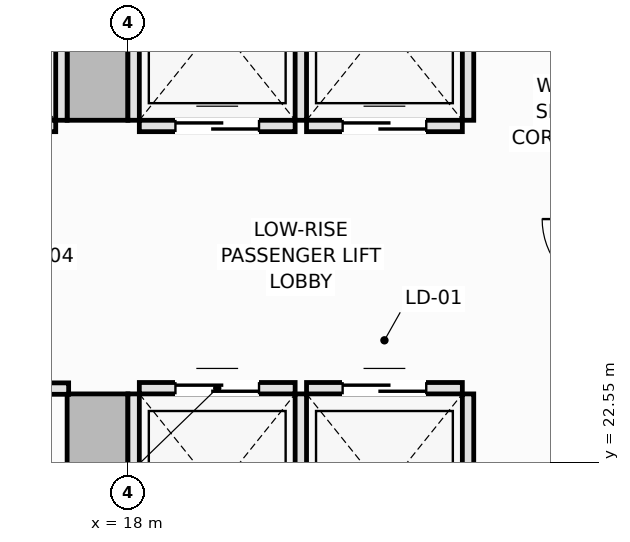
"""IFC4 building model, lengths in metres.
Left out: names, types, materials, properties, quantities, classifications, styles, units other than length and angle.
Written with IfcOpenShell. Run it as: python <this file> out.ifc"""

import sys

from ifc_helpers import new_model, si_unit, direction, frame, frame_2d, origin, place, context, subcontext, project, spatial, rectangle, extrude, element, fill, save


model = new_model("IFC4")
c1 = context("Model", 3, precision=1e-05, world=origin(), true_north=direction((0.0, 1.0)))
c2 = subcontext(c1, "Body", "Model", "MODEL_VIEW")
j1 = project(units=[si_unit("LENGTHUNIT", "METRE"), si_unit("PLANEANGLEUNIT", "RADIAN")], contexts=[c1])
p1 = place(None, origin())
s1 = spatial("IfcSite", under=j1, at=p1, CompositionType="ELEMENT")
p2 = place(p1, origin())
s2 = spatial("IfcBuilding", under=s1, at=p2, CompositionType="ELEMENT")
p3 = place(p2, frame((0.0, 0.0, 29.15)))
s3 = spatial("IfcBuildingStorey", under=s2, at=p3, CompositionType="ELEMENT", Elevation=29.15)
p4 = place(p3, frame((17.6, 14.8, 0.0), z_axis=(0.0, 0.0, 1.0), x_axis=(0.0, 1.0, 0.0)))
e1 = element("IfcWall", 1, at=p4, inside=s3, PredefinedType="SHEAR", context=c2, shape_type="SweptSolid", body=[
    extrude(rectangle(XDim=8.65, YDim=0.8, at=frame_2d((4.325, 0.0))), origin(), (0.0, 0.0, 1.0), 3.55),
])
p5 = place(p4, frame((4.1, 0.0, 0.0)))
e2 = element("IfcOpeningElement", 2, at=p5, cuts=e1, PredefinedType="OPENING", context=c2, shape_type="SweptSolid", body=[
    extrude(rectangle(XDim=1.1, YDim=2.15, at=frame_2d((0.55, 1.075))), frame((0.0, 0.41, 0.0), z_axis=(0.0, -1.0, 0.0), x_axis=(1.0, 0.0, 0.0)), (0.0, 0.0, 1.0), 0.82),
])
p6 = place(p3, frame((17.6, 27.05, 0.0), z_axis=(0.0, 0.0, 1.0), x_axis=(0.0, 1.0, 0.0)))
e3 = element("IfcWall", 3, at=p6, inside=s3, PredefinedType="SHEAR", context=c2, shape_type="SweptSolid", body=[
    extrude(rectangle(XDim=8.65, YDim=0.8, at=frame_2d((4.325, 0.0))), origin(), (0.0, 0.0, 1.0), 3.55),
])
p7 = place(p6, frame((3.45, 0.0, 0.0)))
e4 = element("IfcOpeningElement", 4, at=p7, cuts=e3, PredefinedType="OPENING", context=c2, shape_type="SweptSolid", body=[
    extrude(rectangle(XDim=1.1, YDim=2.15, at=frame_2d((0.55, 1.075))), frame((0.0, 0.41, 0.0), z_axis=(0.0, -1.0, 0.0), x_axis=(1.0, 0.0, 0.0)), (0.0, 0.0, 1.0), 0.82),
])
p8 = place(p3, frame((18.15, 23.525, 0.0), z_axis=(0.0, 0.0, 1.0), x_axis=(1.0, 0.0, 0.0)))
e5 = element("IfcWall", 5, at=p8, inside=s3, PredefinedType="PARTITIONING", context=c2, shape_type="SweptSolid", body=[
    extrude(rectangle(XDim=2.05, YDim=0.15, at=frame_2d((1.025, 0.0))), origin(), (0.0, 0.0, 1.0), 3.37),
])
p9 = place(p8, frame((0.475, 0.0, 0.0)))
e6 = element("IfcOpeningElement", 6, at=p9, cuts=e5, PredefinedType="OPENING", context=c2, shape_type="SweptSolid", body=[
    extrude(rectangle(XDim=1.1, YDim=2.2, at=frame_2d((0.55, 1.1))), frame((0.0, 0.085, 0.0), z_axis=(0.0, -1.0, 0.0), x_axis=(1.0, 0.0, 0.0)), (0.0, 0.0, 1.0), 0.17),
])
for number, where, z_axis, x_axis in (
    (7, (18.075, 20.9, 0.0), (0.0, 0.0, 1.0), (0.0, 1.0, 0.0)),
    (8, (20.275, 20.9, 0.0), (0.0, 0.0, 1.0), (0.0, 1.0, 0.0)),
):
    element("IfcWall", number, at=place(p3, frame(where, z_axis=z_axis, x_axis=x_axis)), inside=s3, PredefinedType="PARTITIONING", context=c2, shape_type="SweptSolid", body=[
        extrude(rectangle(XDim=2.55, YDim=0.15, at=frame_2d((1.275, 0.0))), origin(), (0.0, 0.0, 1.0), 3.37),
    ])
p10 = place(p3, frame((20.35, 23.525, 0.0), z_axis=(0.0, 0.0, 1.0), x_axis=(1.0, 0.0, 0.0)))
e9 = element("IfcWall", 9, at=p10, inside=s3, PredefinedType="PARTITIONING", context=c2, shape_type="SweptSolid", body=[
    extrude(rectangle(XDim=2.05, YDim=0.15, at=frame_2d((1.025, 0.0))), origin(), (0.0, 0.0, 1.0), 3.37),
])
p11 = place(p10, frame((0.475, 0.0, 0.0)))
e10 = element("IfcOpeningElement", 10, at=p11, cuts=e9, PredefinedType="OPENING", context=c2, shape_type="SweptSolid", body=[
    extrude(rectangle(XDim=1.1, YDim=2.2, at=frame_2d((0.55, 1.1))), frame((0.0, 0.085, 0.0), z_axis=(0.0, -1.0, 0.0), x_axis=(1.0, 0.0, 0.0)), (0.0, 0.0, 1.0), 0.17),
])
p12 = place(p3, frame((22.475, 20.9, 0.0), z_axis=(0.0, 0.0, 1.0), x_axis=(0.0, 1.0, 0.0)))
e11 = element("IfcWall", 11, at=p12, inside=s3, PredefinedType="PARTITIONING", context=c2, shape_type="SweptSolid", body=[
    extrude(rectangle(XDim=2.55, YDim=0.15, at=frame_2d((1.275, 0.0))), origin(), (0.0, 0.0, 1.0), 3.37),
])
p13 = place(p3, frame((18.15, 26.975, 0.0), z_axis=(0.0, 0.0, 1.0), x_axis=(1.0, 0.0, 0.0)))
e12 = element("IfcWall", 12, at=p13, inside=s3, PredefinedType="PARTITIONING", context=c2, shape_type="SweptSolid", body=[
    extrude(rectangle(XDim=2.05, YDim=0.15, at=frame_2d((1.025, 0.0))), origin(), (0.0, 0.0, 1.0), 3.37),
])
p14 = place(p13, frame((0.475, 0.0, 0.0)))
e13 = element("IfcOpeningElement", 13, at=p14, cuts=e12, PredefinedType="OPENING", context=c2, shape_type="SweptSolid", body=[
    extrude(rectangle(XDim=1.1, YDim=2.2, at=frame_2d((0.55, 1.1))), frame((0.0, 0.085, 0.0), z_axis=(0.0, -1.0, 0.0), x_axis=(1.0, 0.0, 0.0)), (0.0, 0.0, 1.0), 0.17),
])
for number, where, z_axis, x_axis in (
    (14, (18.075, 27.05, 0.0), (0.0, 0.0, 1.0), (0.0, 1.0, 0.0)),
    (15, (20.275, 27.05, 0.0), (0.0, 0.0, 1.0), (0.0, 1.0, 0.0)),
):
    element("IfcWall", number, at=place(p3, frame(where, z_axis=z_axis, x_axis=x_axis)), inside=s3, PredefinedType="PARTITIONING", context=c2, shape_type="SweptSolid", body=[
        extrude(rectangle(XDim=2.55, YDim=0.15, at=frame_2d((1.275, 0.0))), origin(), (0.0, 0.0, 1.0), 3.37),
    ])
p15 = place(p3, frame((20.35, 26.975, 0.0), z_axis=(0.0, 0.0, 1.0), x_axis=(1.0, 0.0, 0.0)))
e16 = element("IfcWall", 16, at=p15, inside=s3, PredefinedType="PARTITIONING", context=c2, shape_type="SweptSolid", body=[
    extrude(rectangle(XDim=2.05, YDim=0.15, at=frame_2d((1.025, 0.0))), origin(), (0.0, 0.0, 1.0), 3.37),
])
p16 = place(p15, frame((0.475, 0.0, 0.0)))
e17 = element("IfcOpeningElement", 17, at=p16, cuts=e16, PredefinedType="OPENING", context=c2, shape_type="SweptSolid", body=[
    extrude(rectangle(XDim=1.1, YDim=2.2, at=frame_2d((0.55, 1.1))), frame((0.0, 0.085, 0.0), z_axis=(0.0, -1.0, 0.0), x_axis=(1.0, 0.0, 0.0)), (0.0, 0.0, 1.0), 0.17),
])
p17 = place(p3, frame((22.475, 27.05, 0.0), z_axis=(0.0, 0.0, 1.0), x_axis=(0.0, 1.0, 0.0)))
e18 = element("IfcWall", 18, at=p17, inside=s3, PredefinedType="PARTITIONING", context=c2, shape_type="SweptSolid", body=[
    extrude(rectangle(XDim=2.55, YDim=0.15, at=frame_2d((1.275, 0.0))), origin(), (0.0, 0.0, 1.0), 3.37),
])
p18 = place(p3, frame((14.5, 26.975, 0.0), z_axis=(0.0, 0.0, 1.0), x_axis=(1.0, 0.0, 0.0)))
e19 = element("IfcWall", 19, at=p18, inside=s3, PredefinedType="PARTITIONING", context=c2, shape_type="SweptSolid", body=[
    extrude(rectangle(XDim=2.55, YDim=0.15, at=frame_2d((1.275, 0.0))), origin(), (0.0, 0.0, 1.0), 3.37),
])
p19 = place(p18, frame((0.625, 0.0, 0.0)))
e20 = element("IfcOpeningElement", 20, at=p19, cuts=e19, PredefinedType="OPENING", context=c2, shape_type="SweptSolid", body=[
    extrude(rectangle(XDim=1.3, YDim=2.2, at=frame_2d((0.65, 1.1))), frame((0.0, 0.085, 0.0), z_axis=(0.0, -1.0, 0.0), x_axis=(1.0, 0.0, 0.0)), (0.0, 0.0, 1.0), 0.17),
])
p20 = place(p3, frame((17.125, 27.05, 0.0), z_axis=(0.0, 0.0, 1.0), x_axis=(0.0, 1.0, 0.0)))
e21 = element("IfcWall", 21, at=p20, inside=s3, PredefinedType="PARTITIONING", context=c2, shape_type="SweptSolid", body=[
    extrude(rectangle(XDim=2.6, YDim=0.15, at=frame_2d((1.3, 0.0))), origin(), (0.0, 0.0, 1.0), 3.37),
])
p21 = place(p3, frame((14.33, 23.52, 0.0), z_axis=(0.0, 0.0, 1.0), x_axis=(1.0, 0.0, 0.0)))
e22 = element("IfcWall", 22, at=p21, inside=s3, PredefinedType="PARTITIONING", context=c2, shape_type="SweptSolid", body=[
    extrude(rectangle(XDim=2.89, YDim=0.15, at=frame_2d((1.445, 0.0))), origin(), (0.0, 0.0, 1.0), 3.37),
])
p22 = place(p21, frame((0.28, 0.0, 0.0)))
e23 = element("IfcOpeningElement", 23, at=p22, cuts=e22, PredefinedType="OPENING", context=c2, shape_type="SweptSolid", body=[
    extrude(rectangle(XDim=0.9, YDim=2.1, at=frame_2d((0.45, 1.05))), frame((0.0, 0.085, 0.0), z_axis=(0.0, -1.0, 0.0), x_axis=(1.0, 0.0, 0.0)), (0.0, 0.0, 1.0), 0.17),
])
p23 = place(p21, frame((1.71, 0.0, 0.0)))
e24 = element("IfcOpeningElement", 24, at=p23, cuts=e22, PredefinedType="OPENING", context=c2, shape_type="SweptSolid", body=[
    extrude(rectangle(XDim=0.9, YDim=2.1, at=frame_2d((0.45, 1.05))), frame((0.0, 0.085, 0.0), z_axis=(0.0, -1.0, 0.0), x_axis=(1.0, 0.0, 0.0)), (0.0, 0.0, 1.0), 0.17),
])
p24 = place(p9, origin())
e25 = element("IfcDoor", 25, at=p24, inside=s3, OperationType="DOUBLE_DOOR_SLIDING", PredefinedType="DOOR", context=c2, shape_type="SweptSolid", body=[
    extrude(rectangle(XDim=1.1, YDim=2.2, at=frame_2d((0.55, 1.1))), frame((0.0, 0.025, 0.0), z_axis=(0.0, -1.0, 0.0), x_axis=(1.0, 0.0, 0.0)), (0.0, 0.0, 1.0), 0.05),
])
fill(e6, e25)
p25 = place(p11, origin())
e26 = element("IfcDoor", 26, at=p25, inside=s3, OperationType="DOUBLE_DOOR_SLIDING", PredefinedType="DOOR", context=c2, shape_type="SweptSolid", body=[
    extrude(rectangle(XDim=1.1, YDim=2.2, at=frame_2d((0.55, 1.1))), frame((0.0, 0.025, 0.0), z_axis=(0.0, -1.0, 0.0), x_axis=(1.0, 0.0, 0.0)), (0.0, 0.0, 1.0), 0.05),
])
fill(e10, e26)
p26 = place(p14, origin())
e27 = element("IfcDoor", 27, at=p26, inside=s3, OperationType="DOUBLE_DOOR_SLIDING", PredefinedType="DOOR", context=c2, shape_type="SweptSolid", body=[
    extrude(rectangle(XDim=1.1, YDim=2.2, at=frame_2d((0.55, 1.1))), frame((0.0, 0.025, 0.0), z_axis=(0.0, -1.0, 0.0), x_axis=(1.0, 0.0, 0.0)), (0.0, 0.0, 1.0), 0.05),
])
fill(e13, e27)
p27 = place(p16, origin())
e28 = element("IfcDoor", 28, at=p27, inside=s3, OperationType="DOUBLE_DOOR_SLIDING", PredefinedType="DOOR", context=c2, shape_type="SweptSolid", body=[
    extrude(rectangle(XDim=1.1, YDim=2.2, at=frame_2d((0.55, 1.1))), frame((0.0, 0.025, 0.0), z_axis=(0.0, -1.0, 0.0), x_axis=(1.0, 0.0, 0.0)), (0.0, 0.0, 1.0), 0.05),
])
fill(e17, e28)
save(model, sys.argv[1])
